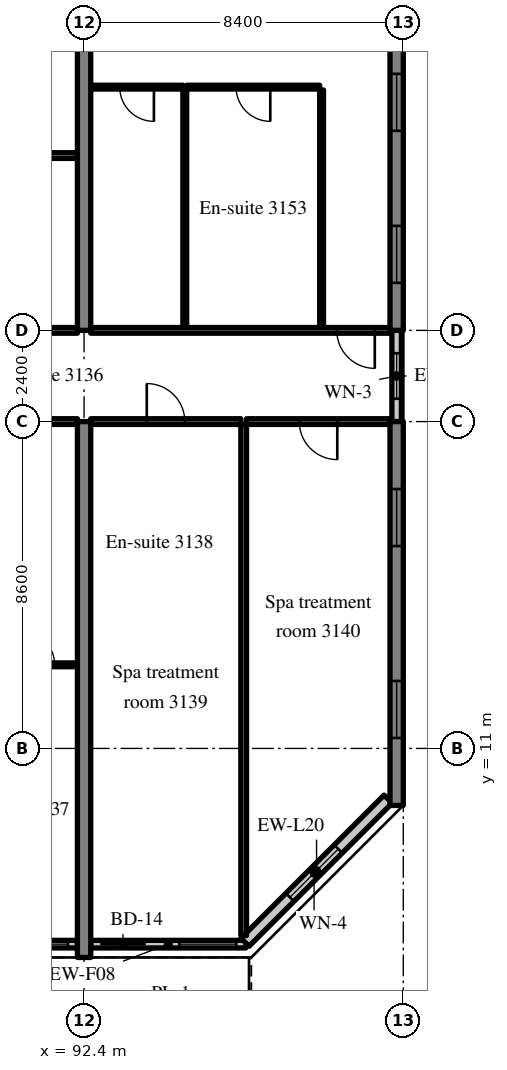
"""IFC4 building model, lengths in metres.
Left out: names, types, materials, properties, quantities, classifications, styles, units other than length and angle.
Written with IfcOpenShell. Run it as: python <this file> out.ifc"""

import sys

from ifc_helpers import new_model, si_unit, direction, frame, frame_2d, origin, place, context, subcontext, project, spatial, rectangle, extrude, source, transform, mapped, element, fill, save


model = new_model("IFC4")
c1 = context("Model", 3, precision=1e-05, world=origin(), true_north=direction((0.0, 1.0)))
c2 = subcontext(c1, "Body", "Model", "MODEL_VIEW")
j1 = project(units=[si_unit("LENGTHUNIT", "METRE"), si_unit("PLANEANGLEUNIT", "RADIAN")], contexts=[c1])
p1 = place(None, origin())
s1 = spatial("IfcSite", under=j1, at=p1, CompositionType="ELEMENT")
p2 = place(p1, origin())
s2 = spatial("IfcBuilding", under=s1, at=p2, CompositionType="ELEMENT")
p3 = place(p2, frame((0.0, 0.0, 129.4)))
s3 = spatial("IfcBuildingStorey", under=s2, at=p3, CompositionType="ELEMENT", Elevation=129.4)
m1 = source(origin(), c2, "Body", "SweptSolid", [
    extrude(rectangle(XDim=14.1, YDim=0.35, at=frame_2d((7.05, 0.0))), origin(), (0.0, 0.0, 1.0), 3.52),
])
p4 = place(p3, frame((92.4, 5.5, 0.0), z_axis=(0.0, 0.0, 1.0), x_axis=(0.0, 1.0, 0.0)))
e1 = element("IfcWall", 1, at=p4, inside=s3, PredefinedType="SHEAR", context=c2, shape_type="MappedRepresentation", body=[
    mapped(m1, transform((0.0, 0.0, 0.0), scale=1.0)),
])
m2 = source(origin(), c2, "Body", "SweptSolid", [
    extrude(rectangle(XDim=20.0, YDim=0.35, at=frame_2d((10.0, 0.0))), origin(), (0.0, 0.0, 1.0), 3.52),
])
p5 = place(p3, frame((92.4, 22.0, 0.0), z_axis=(0.0, 0.0, 1.0), x_axis=(0.0, 1.0, 0.0)))
e2 = element("IfcWall", 2, at=p5, inside=s3, PredefinedType="SHEAR", context=c2, shape_type="MappedRepresentation", body=[
    mapped(m2, transform((0.0, 0.0, 0.0), scale=1.0)),
])
m3 = source(origin(), c2, "Body", "SweptSolid", [
    extrude(rectangle(XDim=10.1, YDim=0.35, at=frame_2d((5.05, 0.0))), origin(), (0.0, 0.0, 1.0), 3.52),
])
p6 = place(p3, frame((100.625, 9.5, 0.0), z_axis=(0.0, 0.0, 1.0), x_axis=(0.0, 1.0, 0.0)))
e3 = element("IfcWall", 3, at=p6, inside=s3, PredefinedType="SHEAR", context=c2, shape_type="MappedRepresentation", body=[
    mapped(m3, transform((0.0, 0.0, 0.0), scale=1.0)),
])
m4 = source(origin(), c2, "Body", "SweptSolid", [
    extrude(rectangle(XDim=1.5, YDim=1.5, at=frame_2d((0.75, 0.75))), frame((0.0, 0.185, 0.0), z_axis=(0.0, -1.0, 0.0), x_axis=(1.0, 0.0, 0.0)), (0.0, 0.0, 1.0), 0.37),
])
p7 = place(p6, frame((1.775, 0.0, 0.9)))
e4 = element("IfcOpeningElement", 4, at=p7, cuts=e3, PredefinedType="OPENING", context=c2, shape_type="MappedRepresentation", body=[
    mapped(m4, transform((0.0, 0.0, 0.0), scale=1.0)),
])
p8 = place(p6, frame((6.825, 0.0, 0.9)))
e5 = element("IfcOpeningElement", 5, at=p8, cuts=e3, PredefinedType="OPENING", context=c2, shape_type="MappedRepresentation", body=[
    mapped(m4, transform((0.0, 0.0, 0.0), scale=1.0)),
])
m5 = source(origin(), c2, "Body", "SweptSolid", [
    extrude(rectangle(XDim=16.0, YDim=0.35, at=frame_2d((8.0, 0.0))), origin(), (0.0, 0.0, 1.0), 3.52),
])
p9 = place(p3, frame((100.625, 22.0, 0.0), z_axis=(0.0, 0.0, 1.0), x_axis=(0.0, 1.0, 0.0)))
e6 = element("IfcWall", 6, at=p9, inside=s3, PredefinedType="SHEAR", context=c2, shape_type="MappedRepresentation", body=[
    mapped(m5, transform((0.0, 0.0, 0.0), scale=1.0)),
])
p10 = place(p9, frame((1.25, 0.0, 0.9)))
e7 = element("IfcOpeningElement", 7, at=p10, cuts=e6, PredefinedType="OPENING", context=c2, shape_type="MappedRepresentation", body=[
    mapped(m4, transform((0.0, 0.0, 0.0), scale=1.0)),
])
p11 = place(p9, frame((5.25, 0.0, 0.9)))
e8 = element("IfcOpeningElement", 8, at=p11, cuts=e6, PredefinedType="OPENING", context=c2, shape_type="MappedRepresentation", body=[
    mapped(m4, transform((0.0, 0.0, 0.0), scale=1.0)),
])
p12 = place(p9, frame((9.25, 0.0, 0.9)))
e9 = element("IfcOpeningElement", 9, at=p12, cuts=e6, PredefinedType="OPENING", context=c2, shape_type="MappedRepresentation", body=[
    mapped(m4, transform((0.0, 0.0, 0.0), scale=1.0)),
])
p13 = place(p9, frame((13.25, 0.0, 0.9)))
e10 = element("IfcOpeningElement", 10, at=p13, cuts=e6, PredefinedType="OPENING", context=c2, shape_type="MappedRepresentation", body=[
    mapped(m4, transform((0.0, 0.0, 0.0), scale=1.0)),
])
m6 = source(origin(), c2, "Body", "SweptSolid", [
    extrude(rectangle(XDim=8.05, YDim=0.2, at=frame_2d((4.025, 0.0))), origin(), (0.0, 0.0, 1.0), 2.82),
])
p14 = place(p3, frame((84.175, 5.85, 0.0), z_axis=(0.0, 0.0, 1.0), x_axis=(1.0, 0.0, 0.0)))
e11 = element("IfcWall", 11, at=p14, inside=s3, PredefinedType="SOLIDWALL", context=c2, shape_type="MappedRepresentation", body=[
    mapped(m6, transform((0.0, 0.0, 0.0), scale=1.0)),
])
m7 = source(origin(), c2, "Body", "SweptSolid", [
    extrude(rectangle(XDim=1.2, YDim=2.4, at=frame_2d((0.6, 1.2))), frame((0.0, 0.11, 0.0), z_axis=(0.0, -1.0, 0.0), x_axis=(1.0, 0.0, 0.0)), (0.0, 0.0, 1.0), 0.22),
])
p15 = place(p14, frame((0.25, 0.0, 0.0)))
e12 = element("IfcOpeningElement", 12, at=p15, cuts=e11, PredefinedType="OPENING", context=c2, shape_type="MappedRepresentation", body=[
    mapped(m7, transform((0.0, 0.0, 0.0), scale=1.0)),
])
m8 = source(origin(), c2, "Body", "SweptSolid", [
    extrude(rectangle(XDim=1.5, YDim=1.5, at=frame_2d((0.75, 0.75))), frame((0.0, 0.11, 0.0), z_axis=(0.0, -1.0, 0.0), x_axis=(1.0, 0.0, 0.0)), (0.0, 0.0, 1.0), 0.22),
])
p16 = place(p14, frame((2.275, 0.0, 0.9)))
e13 = element("IfcOpeningElement", 13, at=p16, cuts=e11, PredefinedType="OPENING", context=c2, shape_type="MappedRepresentation", body=[
    mapped(m8, transform((0.0, 0.0, 0.0), scale=1.0)),
])
p17 = place(p14, frame((4.275, 0.0, 0.0)))
e14 = element("IfcOpeningElement", 14, at=p17, cuts=e11, PredefinedType="OPENING", context=c2, shape_type="MappedRepresentation", body=[
    mapped(m7, transform((0.0, 0.0, 0.0), scale=1.0)),
])
p18 = place(p14, frame((6.3, 0.0, 0.9)))
e15 = element("IfcOpeningElement", 15, at=p18, cuts=e11, PredefinedType="OPENING", context=c2, shape_type="MappedRepresentation", body=[
    mapped(m8, transform((0.0, 0.0, 0.0), scale=1.0)),
])
m9 = source(origin(), c2, "Body", "SweptSolid", [
    extrude(rectangle(XDim=4.08, YDim=0.2, at=frame_2d((2.04, 0.0))), origin(), (0.0, 0.0, 1.0), 2.82),
])
p19 = place(p3, frame((92.575, 5.85, 0.0), z_axis=(0.0, 0.0, 1.0), x_axis=(1.0, 0.0, 0.0)))
e16 = element("IfcWall", 16, at=p19, inside=s3, PredefinedType="SOLIDWALL", context=c2, shape_type="MappedRepresentation", body=[
    mapped(m9, transform((0.0, 0.0, 0.0), scale=1.0)),
])
p20 = place(p19, frame((0.25, 0.0, 0.0)))
e17 = element("IfcOpeningElement", 17, at=p20, cuts=e16, PredefinedType="OPENING", context=c2, shape_type="MappedRepresentation", body=[
    mapped(m7, transform((0.0, 0.0, 0.0), scale=1.0)),
])
p21 = place(p19, frame((2.33, 0.0, 0.9)))
e18 = element("IfcOpeningElement", 18, at=p21, cuts=e16, PredefinedType="OPENING", context=c2, shape_type="MappedRepresentation", body=[
    mapped(m8, transform((0.0, 0.0, 0.0), scale=1.0)),
])
m10 = source(origin(), c2, "Body", "SweptSolid", [
    extrude(rectangle(XDim=5.326, YDim=0.3, at=frame_2d((2.663, 0.0))), origin(), (0.0, 0.0, 1.0), 3.52),
])
p22 = place(p3, frame((96.634, 5.9, 0.0), z_axis=(0.0, 0.0, 1.0), x_axis=(0.707083859269, 0.707129702361, 0.0)))
e19 = element("IfcWall", 19, at=p22, inside=s3, PredefinedType="SOLIDWALL", context=c2, shape_type="MappedRepresentation", body=[
    mapped(m10, transform((0.0, 0.0, 0.0), scale=1.0)),
])
m11 = source(origin(), c2, "Body", "SweptSolid", [
    extrude(rectangle(XDim=1.8, YDim=1.5, at=frame_2d((0.9, 0.75))), frame((0.0, 0.16, 0.0), z_axis=(0.0, -1.0, 0.0), x_axis=(1.0, 0.0, 0.0)), (0.0, 0.0, 1.0), 0.32),
])
p23 = place(p22, frame((1.672, 0.0, 0.9)))
e20 = element("IfcOpeningElement", 20, at=p23, cuts=e19, PredefinedType="OPENING", context=c2, shape_type="MappedRepresentation", body=[
    mapped(m11, transform((0.0, 0.0, 0.0), scale=1.0)),
])
m12 = source(origin(), c2, "Body", "SweptSolid", [
    extrude(rectangle(XDim=2.4, YDim=0.25, at=frame_2d((1.2, 0.0))), origin(), (0.0, 0.0, 1.0), 2.62),
])
p24 = place(p3, frame((100.625, 19.6, 0.0), z_axis=(0.0, 0.0, 1.0), x_axis=(0.0, 1.0, 0.0)))
e21 = element("IfcWall", 21, at=p24, inside=s3, PredefinedType="SOLIDWALL", context=c2, shape_type="MappedRepresentation", body=[
    mapped(m12, transform((0.0, 0.0, 0.0), scale=1.0)),
])
m13 = source(origin(), c2, "Body", "SweptSolid", [
    extrude(rectangle(XDim=1.2, YDim=1.5, at=frame_2d((0.6, 0.75))), frame((0.0, 0.135, 0.0), z_axis=(0.0, -1.0, 0.0), x_axis=(1.0, 0.0, 0.0)), (0.0, 0.0, 1.0), 0.27),
])
p25 = place(p24, frame((0.6, 0.0, 0.9)))
e22 = element("IfcOpeningElement", 22, at=p25, cuts=e21, PredefinedType="OPENING", context=c2, shape_type="MappedRepresentation", body=[
    mapped(m13, transform((0.0, 0.0, 0.0), scale=1.0)),
])
m14 = source(origin(), c2, "Body", "SweptSolid", [
    extrude(rectangle(XDim=2.1, YDim=0.1, at=frame_2d((1.05, 0.0))), origin(), (0.0, 0.0, 1.0), 3.52),
])
p26 = place(p3, frame((90.125, 13.2, 0.0), z_axis=(0.0, 0.0, 1.0), x_axis=(1.0, 0.0, 0.0)))
e23 = element("IfcWall", 23, at=p26, inside=s3, PredefinedType="PARTITIONING", context=c2, shape_type="MappedRepresentation", body=[
    mapped(m14, transform((0.0, 0.0, 0.0), scale=1.0)),
])
m15 = source(origin(), c2, "Body", "SweptSolid", [
    extrude(rectangle(XDim=0.9, YDim=2.1, at=frame_2d((0.45, 1.05))), frame((0.0, 0.06, 0.0), z_axis=(0.0, -1.0, 0.0), x_axis=(1.0, 0.0, 0.0)), (0.0, 0.0, 1.0), 0.12),
])
p27 = place(p26, frame((0.6, 0.0, 0.0)))
e24 = element("IfcOpeningElement", 24, at=p27, cuts=e23, PredefinedType="OPENING", context=c2, shape_type="MappedRepresentation", body=[
    mapped(m15, transform((0.0, 0.0, 0.0), scale=1.0)),
])
m16 = source(origin(), c2, "Body", "SweptSolid", [
    extrude(rectangle(XDim=3.95, YDim=0.15, at=frame_2d((1.975, 0.0))), origin(), (0.0, 0.0, 1.0), 2.82),
])
p28 = place(p3, frame((88.275, 19.6, 0.0), z_axis=(0.0, 0.0, 1.0), x_axis=(1.0, 0.0, 0.0)))
e25 = element("IfcWall", 25, at=p28, inside=s3, PredefinedType="PARTITIONING", context=c2, shape_type="MappedRepresentation", body=[
    mapped(m16, transform((0.0, 0.0, 0.0), scale=1.0)),
])
m17 = source(origin(), c2, "Body", "SweptSolid", [
    extrude(rectangle(XDim=1.0, YDim=2.1, at=frame_2d((0.5, 1.05))), frame((0.0, 0.085, 0.0), z_axis=(0.0, -1.0, 0.0), x_axis=(1.0, 0.0, 0.0)), (0.0, 0.0, 1.0), 0.17),
])
p29 = place(p28, frame((0.4, 0.0, 0.0)))
e26 = element("IfcOpeningElement", 26, at=p29, cuts=e25, PredefinedType="OPENING", context=c2, shape_type="MappedRepresentation", body=[
    mapped(m17, transform((0.0, 0.0, 0.0), scale=1.0)),
])
m18 = source(origin(), c2, "Body", "SweptSolid", [
    extrude(rectangle(XDim=3.95, YDim=0.15, at=frame_2d((1.975, 0.0))), origin(), (0.0, 0.0, 1.0), 2.82),
])
p30 = place(p3, frame((92.575, 19.6, 0.0), z_axis=(0.0, 0.0, 1.0), x_axis=(1.0, 0.0, 0.0)))
e27 = element("IfcWall", 27, at=p30, inside=s3, PredefinedType="PARTITIONING", context=c2, shape_type="MappedRepresentation", body=[
    mapped(m18, transform((0.0, 0.0, 0.0), scale=1.0)),
])
p31 = place(p30, frame((1.475, 0.0, 0.0)))
e28 = element("IfcOpeningElement", 28, at=p31, cuts=e27, PredefinedType="OPENING", context=c2, shape_type="MappedRepresentation", body=[
    mapped(m17, transform((0.0, 0.0, 0.0), scale=1.0)),
])
m19 = source(origin(), c2, "Body", "SweptSolid", [
    extrude(rectangle(XDim=3.775, YDim=0.15, at=frame_2d((1.887, 0.0))), origin(), (0.0, 0.0, 1.0), 2.82),
])
p32 = place(p3, frame((96.675, 19.6, 0.0), z_axis=(0.0, 0.0, 1.0), x_axis=(1.0, 0.0, 0.0)))
e29 = element("IfcWall", 29, at=p32, inside=s3, PredefinedType="PARTITIONING", context=c2, shape_type="MappedRepresentation", body=[
    mapped(m19, transform((0.0, 0.0, 0.0), scale=1.0)),
])
p33 = place(p32, frame((1.388, 0.0, 0.0)))
e30 = element("IfcOpeningElement", 30, at=p33, cuts=e29, PredefinedType="OPENING", context=c2, shape_type="MappedRepresentation", body=[
    mapped(m17, transform((0.0, 0.0, 0.0), scale=1.0)),
])
m20 = source(origin(), c2, "Body", "SweptSolid", [
    extrude(rectangle(XDim=13.447, YDim=0.15, at=frame_2d((6.724, 0.0))), origin(), (0.0, 0.0, 1.0), 3.52),
])
p34 = place(p3, frame((96.6, 6.078, 0.0), z_axis=(0.0, 0.0, 1.0), x_axis=(0.0, 1.0, 0.0)))
e31 = element("IfcWall", 31, at=p34, inside=s3, PredefinedType="PARTITIONING", context=c2, shape_type="MappedRepresentation", body=[
    mapped(m20, transform((0.0, 0.0, 0.0), scale=1.0)),
])
m21 = source(origin(), c2, "Body", "SweptSolid", [
    extrude(rectangle(XDim=5.5, YDim=0.15, at=frame_2d((2.75, 0.0))), origin(), (0.0, 0.0, 1.0), 2.82),
])
p35 = place(p3, frame((86.725, 22.0, 0.0), z_axis=(0.0, 0.0, 1.0), x_axis=(1.0, 0.0, 0.0)))
e32 = element("IfcWall", 32, at=p35, inside=s3, PredefinedType="PARTITIONING", context=c2, shape_type="MappedRepresentation", body=[
    mapped(m21, transform((0.0, 0.0, 0.0), scale=1.0)),
])
m22 = source(origin(), c2, "Body", "SweptSolid", [
    extrude(rectangle(XDim=5.5, YDim=0.15, at=frame_2d((2.75, 0.0))), origin(), (0.0, 0.0, 1.0), 3.52),
])
p36 = place(p3, frame((86.725, 26.6, 0.0), z_axis=(0.0, 0.0, 1.0), x_axis=(1.0, 0.0, 0.0)))
e33 = element("IfcWall", 33, at=p36, inside=s3, PredefinedType="PARTITIONING", context=c2, shape_type="MappedRepresentation", body=[
    mapped(m22, transform((0.0, 0.0, 0.0), scale=1.0)),
])
m23 = source(origin(), c2, "Body", "SweptSolid", [
    extrude(rectangle(XDim=6.25, YDim=0.1, at=frame_2d((3.125, 0.0))), origin(), (0.0, 0.0, 1.0), 3.52),
])
for number, where, z_axis, x_axis in (
    (34, (98.65, 22.075, 0.0), (0.0, 0.0, 1.0), (0.0, 1.0, 0.0)),
    (35, (95.05, 22.075, 0.0), (0.0, 0.0, 1.0), (0.0, 1.0, 0.0)),
):
    element("IfcWall", number, at=place(p3, frame(where, z_axis=z_axis, x_axis=x_axis)), inside=s3, PredefinedType="PARTITIONING", context=c2, shape_type="MappedRepresentation", body=[
        mapped(m23, transform((0.0, 0.0, 0.0), scale=1.0)),
    ])
m24 = source(origin(), c2, "Body", "SweptSolid", [
    extrude(rectangle(XDim=3.5, YDim=0.1, at=frame_2d((1.75, 0.0))), origin(), (0.0, 0.0, 1.0), 3.52),
])
p37 = place(p3, frame((95.1, 28.4, 0.0), z_axis=(0.0, 0.0, 1.0), x_axis=(1.0, 0.0, 0.0)))
e36 = element("IfcWall", 36, at=p37, inside=s3, PredefinedType="PARTITIONING", context=c2, shape_type="MappedRepresentation", body=[
    mapped(m24, transform((0.0, 0.0, 0.0), scale=1.0)),
])
p38 = place(p37, frame((1.3, 0.0, 0.0)))
e37 = element("IfcOpeningElement", 37, at=p38, cuts=e36, PredefinedType="OPENING", context=c2, shape_type="MappedRepresentation", body=[
    mapped(m15, transform((0.0, 0.0, 0.0), scale=1.0)),
])
m25 = source(origin(), c2, "Body", "SweptSolid", [
    extrude(rectangle(XDim=2.425, YDim=0.1, at=frame_2d((1.212, 0.0))), origin(), (0.0, 0.0, 1.0), 3.52),
])
p39 = place(p3, frame((92.575, 28.4, 0.0), z_axis=(0.0, 0.0, 1.0), x_axis=(1.0, 0.0, 0.0)))
e38 = element("IfcWall", 38, at=p39, inside=s3, PredefinedType="PARTITIONING", context=c2, shape_type="MappedRepresentation", body=[
    mapped(m25, transform((0.0, 0.0, 0.0), scale=1.0)),
])
p40 = place(p39, frame((0.763, 0.0, 0.0)))
e39 = element("IfcOpeningElement", 39, at=p40, cuts=e38, PredefinedType="OPENING", context=c2, shape_type="MappedRepresentation", body=[
    mapped(m15, transform((0.0, 0.0, 0.0), scale=1.0)),
])
m26 = source(origin(), c2, "Body", "SweptSolid", [
    extrude(rectangle(XDim=7.875, YDim=0.15, at=frame_2d((3.938, 0.0))), origin(), (0.0, 0.0, 1.0), 2.82),
])
p41 = place(p3, frame((92.575, 22.0, 0.0), z_axis=(0.0, 0.0, 1.0), x_axis=(1.0, 0.0, 0.0)))
e40 = element("IfcWall", 40, at=p41, inside=s3, PredefinedType="PARTITIONING", context=c2, shape_type="MappedRepresentation", body=[
    mapped(m26, transform((0.0, 0.0, 0.0), scale=1.0)),
])
p42 = place(p41, frame((6.475, 0.0, 0.0)))
e41 = element("IfcOpeningElement", 41, at=p42, cuts=e40, PredefinedType="OPENING", context=c2, shape_type="MappedRepresentation", body=[
    mapped(m17, transform((0.0, 0.0, 0.0), scale=1.0)),
])
m27 = source(origin(), c2, "Body", "SweptSolid", [
    extrude(rectangle(XDim=1.5, YDim=1.5, at=frame_2d((0.75, 0.75))), frame((0.0, 0.03, 0.0), z_axis=(0.0, -1.0, 0.0), x_axis=(1.0, 0.0, 0.0)), (0.0, 0.0, 1.0), 0.06),
])
p43 = place(p18, origin())
e42 = element("IfcWindow", 42, at=p43, inside=s3, PartitioningType="SINGLE_PANEL", PredefinedType="WINDOW", context=c2, shape_type="MappedRepresentation", body=[
    mapped(m27, transform((0.0, 0.0, 0.0), scale=1.0)),
])
fill(e15, e42)
m28 = source(origin(), c2, "Body", "SweptSolid", [
    extrude(rectangle(XDim=1.2, YDim=2.4, at=frame_2d((0.6, 1.2))), frame((0.0, 0.025, 0.0), z_axis=(0.0, -1.0, 0.0), x_axis=(1.0, 0.0, 0.0)), (0.0, 0.0, 1.0), 0.05),
])
p44 = place(p20, origin())
e43 = element("IfcDoor", 43, at=p44, inside=s3, OperationType="SLIDING_TO_RIGHT", PredefinedType="DOOR", context=c2, shape_type="MappedRepresentation", body=[
    mapped(m28, transform((0.0, 0.0, 0.0), scale=1.0)),
])
fill(e17, e43)
p45 = place(p21, origin())
e44 = element("IfcWindow", 44, at=p45, inside=s3, PartitioningType="SINGLE_PANEL", PredefinedType="WINDOW", context=c2, shape_type="MappedRepresentation", body=[
    mapped(m27, transform((0.0, 0.0, 0.0), scale=1.0)),
])
fill(e18, e44)
m29 = source(origin(), c2, "Body", "SweptSolid", [
    extrude(rectangle(XDim=1.8, YDim=1.5, at=frame_2d((0.9, 0.75))), frame((0.0, 0.03, 0.0), z_axis=(0.0, -1.0, 0.0), x_axis=(1.0, 0.0, 0.0)), (0.0, 0.0, 1.0), 0.06),
])
p46 = place(p23, origin())
e45 = element("IfcWindow", 45, at=p46, inside=s3, PartitioningType="SINGLE_PANEL", PredefinedType="WINDOW", context=c2, shape_type="MappedRepresentation", body=[
    mapped(m29, transform((0.0, 0.0, 0.0), scale=1.0)),
])
fill(e20, e45)
p47 = place(p7, origin())
e46 = element("IfcWindow", 46, at=p47, inside=s3, PartitioningType="SINGLE_PANEL", PredefinedType="WINDOW", context=c2, shape_type="MappedRepresentation", body=[
    mapped(m27, transform((0.0, 0.0, 0.0), scale=1.0)),
])
fill(e4, e46)
p48 = place(p8, origin())
e47 = element("IfcWindow", 47, at=p48, inside=s3, PartitioningType="SINGLE_PANEL", PredefinedType="WINDOW", context=c2, shape_type="MappedRepresentation", body=[
    mapped(m27, transform((0.0, 0.0, 0.0), scale=1.0)),
])
fill(e5, e47)
p49 = place(p10, origin())
e48 = element("IfcWindow", 48, at=p49, inside=s3, PartitioningType="SINGLE_PANEL", PredefinedType="WINDOW", context=c2, shape_type="MappedRepresentation", body=[
    mapped(m27, transform((0.0, 0.0, 0.0), scale=1.0)),
])
fill(e7, e48)
p50 = place(p11, origin())
e49 = element("IfcWindow", 49, at=p50, inside=s3, PartitioningType="SINGLE_PANEL", PredefinedType="WINDOW", context=c2, shape_type="MappedRepresentation", body=[
    mapped(m27, transform((0.0, 0.0, 0.0), scale=1.0)),
])
fill(e8, e49)
m30 = source(origin(), c2, "Body", "SweptSolid", [
    extrude(rectangle(XDim=1.2, YDim=1.5, at=frame_2d((0.6, 0.75))), frame((0.0, 0.03, 0.0), z_axis=(0.0, -1.0, 0.0), x_axis=(1.0, 0.0, 0.0)), (0.0, 0.0, 1.0), 0.06),
])
p51 = place(p25, origin())
e50 = element("IfcWindow", 50, at=p51, inside=s3, PartitioningType="SINGLE_PANEL", PredefinedType="WINDOW", context=c2, shape_type="MappedRepresentation", body=[
    mapped(m30, transform((0.0, 0.0, 0.0), scale=1.0)),
])
fill(e22, e50)
m31 = source(origin(), c2, "Body", "SweptSolid", [
    extrude(rectangle(XDim=0.9, YDim=2.1, at=frame_2d((0.45, 1.05))), frame((0.0, 0.025, 0.0), z_axis=(0.0, -1.0, 0.0), x_axis=(1.0, 0.0, 0.0)), (0.0, 0.0, 1.0), 0.05),
])
p52 = place(p27, origin())
e51 = element("IfcDoor", 51, at=p52, inside=s3, OperationType="SINGLE_SWING_LEFT", PredefinedType="DOOR", context=c2, shape_type="MappedRepresentation", body=[
    mapped(m31, transform((0.0, 0.0, 0.0), scale=1.0)),
])
fill(e24, e51)
m32 = source(origin(), c2, "Body", "SweptSolid", [
    extrude(rectangle(XDim=1.0, YDim=2.1, at=frame_2d((0.5, 1.05))), frame((0.0, 0.025, 0.0), z_axis=(0.0, -1.0, 0.0), x_axis=(1.0, 0.0, 0.0)), (0.0, 0.0, 1.0), 0.05),
])
p53 = place(p31, origin())
e52 = element("IfcDoor", 52, at=p53, inside=s3, OperationType="SINGLE_SWING_LEFT", PredefinedType="DOOR", context=c2, shape_type="MappedRepresentation", body=[
    mapped(m32, transform((0.0, 0.0, 0.0), scale=1.0)),
])
fill(e28, e52)
p54 = place(p33, origin())
e53 = element("IfcDoor", 53, at=p54, inside=s3, OperationType="SINGLE_SWING_RIGHT", PredefinedType="DOOR", context=c2, shape_type="MappedRepresentation", body=[
    mapped(m32, transform((0.0, 0.0, 0.0), scale=1.0)),
])
fill(e30, e53)
p55 = place(p38, origin())
e54 = element("IfcDoor", 54, at=p55, inside=s3, OperationType="SINGLE_SWING_RIGHT", PredefinedType="DOOR", context=c2, shape_type="MappedRepresentation", body=[
    mapped(m31, transform((0.0, 0.0, 0.0), scale=1.0)),
])
fill(e37, e54)
p56 = place(p40, origin())
e55 = element("IfcDoor", 55, at=p56, inside=s3, OperationType="SINGLE_SWING_RIGHT", PredefinedType="DOOR", context=c2, shape_type="MappedRepresentation", body=[
    mapped(m31, transform((0.0, 0.0, 0.0), scale=1.0)),
])
fill(e39, e55)
p57 = place(p42, origin())
e56 = element("IfcDoor", 56, at=p57, inside=s3, OperationType="SINGLE_SWING_RIGHT", PredefinedType="DOOR", context=c2, shape_type="MappedRepresentation", body=[
    mapped(m32, transform((0.0, 0.0, 0.0), scale=1.0)),
])
fill(e41, e56)
save(model, sys.argv[1])
